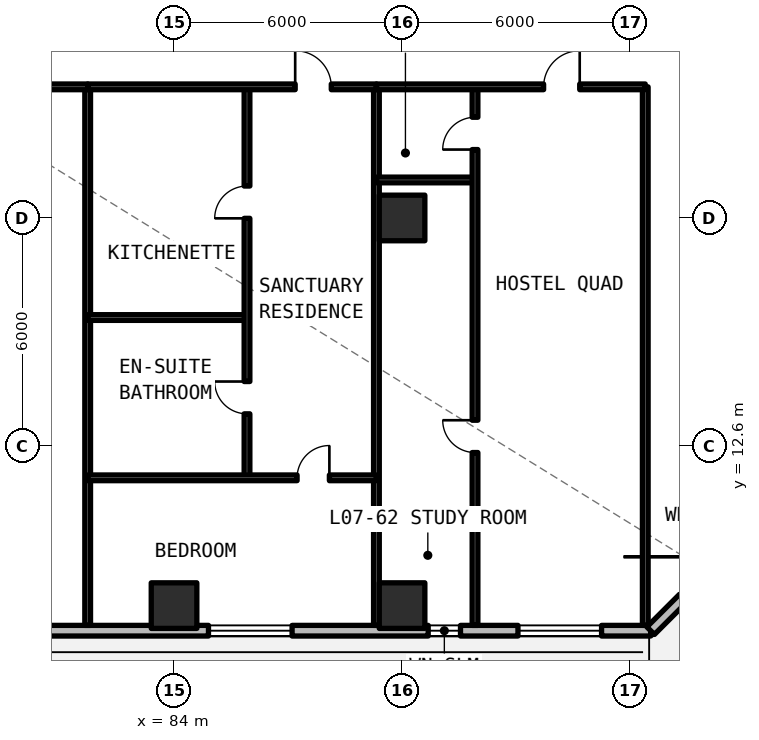
"""IFC4 building model, lengths in metres.
Left out: names, types, materials, properties, quantities, classifications, styles, units other than length and angle.
Written with IfcOpenShell. Run it as: python <this file> out.ifc"""

import sys

from ifc_helpers import new_model, si_unit, direction, frame, frame_2d, origin, origin_2d, place, context, subcontext, project, spatial, rectangle, extrude, element, fill, save


model = new_model("IFC4")
c1 = context("Model", 3, precision=1e-05, world=origin(), true_north=direction((0.0, 1.0)))
c2 = subcontext(c1, "Body", "Model", "MODEL_VIEW")
j1 = project(units=[si_unit("LENGTHUNIT", "METRE"), si_unit("PLANEANGLEUNIT", "RADIAN")], contexts=[c1])
p1 = place(None, origin())
s1 = spatial("IfcSite", under=j1, at=p1, CompositionType="ELEMENT")
p2 = place(p1, origin())
s2 = spatial("IfcBuilding", under=s1, at=p2, CompositionType="ELEMENT")
p3 = place(p2, frame((0.0, 0.0, 29.04)))
s3 = spatial("IfcBuildingStorey", under=s2, at=p3, CompositionType="ELEMENT", Elevation=29.04)
p4 = place(p3, frame((90.0, 18.6, 0.0), z_axis=(0.0, 0.0, 1.0), x_axis=(1.0, 0.0, 0.0)))
e1 = element("IfcColumn", 1, at=p4, inside=s3, PredefinedType="COLUMN", context=c2, shape_type="SweptSolid", body=[
    extrude(rectangle(XDim=1.2, YDim=1.2, at=origin_2d()), origin(), (0.0, 0.0, 1.0), 3.3),
])
for number, where, z_axis, x_axis in (
    (2, (84.0, 8.4, -0.24), (0.0, 0.0, 1.0), (1.0, 0.0, 0.0)),
    (3, (90.0, 8.4, -0.24), (0.0, 0.0, 1.0), (1.0, 0.0, 0.0)),
):
    element("IfcColumn", number, at=place(p3, frame(where, z_axis=z_axis, x_axis=x_axis)), inside=s3, PredefinedType="COLUMN", context=c2, shape_type="SweptSolid", body=[
        extrude(rectangle(XDim=1.2, YDim=1.2, at=origin_2d()), origin(), (0.0, 0.0, 1.0), 3.54),
    ])
p5 = place(p3, frame((52.14, 7.74, 0.0), z_axis=(0.0, 0.0, 1.0), x_axis=(1.0, 0.0, 0.0)))
e4 = element("IfcWall", 4, at=p5, inside=s3, PredefinedType="SOLIDWALL", context=c2, shape_type="SweptSolid", body=[
    extrude(rectangle(XDim=44.402, YDim=0.28, at=frame_2d((22.201, 0.0))), origin(), (0.0, 0.0, 1.0), 3.08),
])
p6 = place(p5, frame((2.664, 0.0, 0.78)))
e5 = element("IfcOpeningElement", 5, at=p6, cuts=e4, PredefinedType="OPENING", context=c2, shape_type="SweptSolid", body=[
    extrude(rectangle(XDim=2.2, YDim=1.66, at=frame_2d((1.1, 0.83))), frame((0.0, 0.15, 0.0), z_axis=(0.0, -1.0, 0.0), x_axis=(1.0, 0.0, 0.0)), (0.0, 0.0, 1.0), 0.3),
])
p7 = place(p5, frame((8.967, 0.0, 0.78)))
e6 = element("IfcOpeningElement", 6, at=p7, cuts=e4, PredefinedType="OPENING", context=c2, shape_type="SweptSolid", body=[
    extrude(rectangle(XDim=2.2, YDim=1.66, at=frame_2d((1.1, 0.83))), frame((0.0, 0.15, 0.0), z_axis=(0.0, -1.0, 0.0), x_axis=(1.0, 0.0, 0.0)), (0.0, 0.0, 1.0), 0.3),
])
p8 = place(p5, frame((16.566, 0.0, 0.78)))
e7 = element("IfcOpeningElement", 7, at=p8, cuts=e4, PredefinedType="OPENING", context=c2, shape_type="SweptSolid", body=[
    extrude(rectangle(XDim=2.2, YDim=1.66, at=frame_2d((1.1, 0.83))), frame((0.0, 0.15, 0.0), z_axis=(0.0, -1.0, 0.0), x_axis=(1.0, 0.0, 0.0)), (0.0, 0.0, 1.0), 0.3),
])
p9 = place(p5, frame((22.826, 0.0, 0.78)))
e8 = element("IfcOpeningElement", 8, at=p9, cuts=e4, PredefinedType="OPENING", context=c2, shape_type="SweptSolid", body=[
    extrude(rectangle(XDim=2.2, YDim=1.66, at=frame_2d((1.1, 0.83))), frame((0.0, 0.15, 0.0), z_axis=(0.0, -1.0, 0.0), x_axis=(1.0, 0.0, 0.0)), (0.0, 0.0, 1.0), 0.3),
])
p10 = place(p5, frame((32.766, 0.0, 0.78)))
e9 = element("IfcOpeningElement", 9, at=p10, cuts=e4, PredefinedType="OPENING", context=c2, shape_type="SweptSolid", body=[
    extrude(rectangle(XDim=2.2, YDim=1.66, at=frame_2d((1.1, 0.83))), frame((0.0, 0.15, 0.0), z_axis=(0.0, -1.0, 0.0), x_axis=(1.0, 0.0, 0.0)), (0.0, 0.0, 1.0), 0.3),
])
p11 = place(p5, frame((38.548, 0.0, 0.78)))
e10 = element("IfcOpeningElement", 10, at=p11, cuts=e4, PredefinedType="OPENING", context=c2, shape_type="SweptSolid", body=[
    extrude(rectangle(XDim=0.85, YDim=1.65, at=frame_2d((0.425, 0.825))), frame((0.0, 0.15, 0.0), z_axis=(0.0, -1.0, 0.0), x_axis=(1.0, 0.0, 0.0)), (0.0, 0.0, 1.0), 0.3),
])
p12 = place(p5, frame((40.91, 0.0, 0.78)))
e11 = element("IfcOpeningElement", 11, at=p12, cuts=e4, PredefinedType="OPENING", context=c2, shape_type="SweptSolid", body=[
    extrude(rectangle(XDim=2.2, YDim=1.66, at=frame_2d((1.1, 0.83))), frame((0.0, 0.15, 0.0), z_axis=(0.0, -1.0, 0.0), x_axis=(1.0, 0.0, 0.0)), (0.0, 0.0, 1.0), 0.3),
])
p13 = place(p3, frame((96.542, 7.74, 0.0), z_axis=(0.0, 0.0, 1.0), x_axis=(0.707106781187, 0.707106781187, 0.0)))
e12 = element("IfcWall", 12, at=p13, inside=s3, PredefinedType="SOLIDWALL", context=c2, shape_type="SweptSolid", body=[
    extrude(rectangle(XDim=5.824, YDim=0.28, at=frame_2d((2.912, 0.0))), origin(), (0.0, 0.0, 1.0), 3.08),
])
p14 = place(p13, frame((1.212, 0.0, 0.78)))
e13 = element("IfcOpeningElement", 13, at=p14, cuts=e12, PredefinedType="OPENING", context=c2, shape_type="SweptSolid", body=[
    extrude(rectangle(XDim=3.4, YDim=1.66, at=frame_2d((1.7, 0.83))), frame((0.0, 0.15, 0.0), z_axis=(0.0, -1.0, 0.0), x_axis=(1.0, 0.0, 0.0)), (0.0, 0.0, 1.0), 0.3),
])
for number, where, z_axis, x_axis in (
    (14, (96.4, 7.88, 0.0), (0.0, 0.0, 1.0), (0.0, 1.0, 0.0)),
    (15, (81.727, 7.88, 0.0), (0.0, 0.0, 1.0), (0.0, 1.0, 0.0)),
):
    element("IfcWall", number, at=place(p3, frame(where, z_axis=z_axis, x_axis=x_axis)), inside=s3, PredefinedType="SOLIDWALL", context=c2, shape_type="SweptSolid", body=[
        extrude(rectangle(XDim=14.17, YDim=0.15, at=frame_2d((7.085, 0.0))), origin(), (0.0, 0.0, 1.0), 2.35),
    ])
p15 = place(p3, frame((73.605, 22.05, 0.0), z_axis=(0.0, 0.0, 1.0), x_axis=(1.0, 0.0, 0.0)))
e16 = element("IfcWall", 16, at=p15, inside=s3, PredefinedType="SOLIDWALL", context=c2, shape_type="SweptSolid", body=[
    extrude(rectangle(XDim=8.122, YDim=0.15, at=frame_2d((4.061, 0.0))), origin(), (0.0, 0.0, 1.0), 2.35),
])
p16 = place(p15, frame((3.511, 0.0, 0.0)))
e17 = element("IfcOpeningElement", 17, at=p16, cuts=e16, PredefinedType="OPENING", context=c2, shape_type="SweptSolid", body=[
    extrude(rectangle(XDim=1.1, YDim=2.15, at=frame_2d((0.55, 1.075))), frame((0.0, 0.085, 0.0), z_axis=(0.0, -1.0, 0.0), x_axis=(1.0, 0.0, 0.0)), (0.0, 0.0, 1.0), 0.17),
])
p17 = place(p3, frame((89.326, 7.88, 0.0), z_axis=(0.0, 0.0, 1.0), x_axis=(0.0, 1.0, 0.0)))
e18 = element("IfcWall", 18, at=p17, inside=s3, PredefinedType="SOLIDWALL", context=c2, shape_type="SweptSolid", body=[
    extrude(rectangle(XDim=14.17, YDim=0.15, at=frame_2d((7.085, 0.0))), origin(), (0.0, 0.0, 1.0), 2.35),
])
p18 = place(p3, frame((81.727, 15.98, 0.0), z_axis=(0.0, 0.0, 1.0), x_axis=(1.0, 0.0, 0.0)))
e19 = element("IfcWall", 19, at=p18, inside=s3, PredefinedType="PARTITIONING", context=c2, shape_type="SweptSolid", body=[
    extrude(rectangle(XDim=4.193, YDim=0.15, at=frame_2d((2.096, 0.0))), origin(), (0.0, 0.0, 1.0), 2.35),
])
p19 = place(p3, frame((85.92, 11.762, 0.0), z_axis=(0.0, 0.0, 1.0), x_axis=(0.0, 1.0, 0.0)))
e20 = element("IfcWall", 20, at=p19, inside=s3, PredefinedType="PARTITIONING", context=c2, shape_type="SweptSolid", body=[
    extrude(rectangle(XDim=10.288, YDim=0.15, at=frame_2d((5.144, 0.0))), origin(), (0.0, 0.0, 1.0), 2.35),
])
p20 = place(p19, frame((1.684, 0.0, 0.0)))
e21 = element("IfcOpeningElement", 21, at=p20, cuts=e20, PredefinedType="OPENING", context=c2, shape_type="SweptSolid", body=[
    extrude(rectangle(XDim=0.85, YDim=2.1, at=frame_2d((0.425, 1.05))), frame((0.0, 0.085, 0.0), z_axis=(0.0, -1.0, 0.0), x_axis=(1.0, 0.0, 0.0)), (0.0, 0.0, 1.0), 0.17),
])
p21 = place(p19, frame((6.828, 0.0, 0.0)))
e22 = element("IfcOpeningElement", 22, at=p21, cuts=e20, PredefinedType="OPENING", context=c2, shape_type="SweptSolid", body=[
    extrude(rectangle(XDim=0.85, YDim=2.1, at=frame_2d((0.425, 1.05))), frame((0.0, 0.085, 0.0), z_axis=(0.0, -1.0, 0.0), x_axis=(1.0, 0.0, 0.0)), (0.0, 0.0, 1.0), 0.17),
])
p22 = place(p3, frame((81.727, 11.762, 0.0), z_axis=(0.0, 0.0, 1.0), x_axis=(1.0, 0.0, 0.0)))
e23 = element("IfcWall", 23, at=p22, inside=s3, PredefinedType="PARTITIONING", context=c2, shape_type="SweptSolid", body=[
    extrude(rectangle(XDim=7.598, YDim=0.15, at=frame_2d((3.799, 0.0))), origin(), (0.0, 0.0, 1.0), 2.35),
])
p23 = place(p22, frame((5.51, 0.0, 0.0)))
e24 = element("IfcOpeningElement", 24, at=p23, cuts=e23, PredefinedType="OPENING", context=c2, shape_type="SweptSolid", body=[
    extrude(rectangle(XDim=0.85, YDim=2.1, at=frame_2d((0.425, 1.05))), frame((0.0, 0.085, 0.0), z_axis=(0.0, -1.0, 0.0), x_axis=(1.0, 0.0, 0.0)), (0.0, 0.0, 1.0), 0.17),
])
p24 = place(p3, frame((81.727, 22.05, 0.0), z_axis=(0.0, 0.0, 1.0), x_axis=(1.0, 0.0, 0.0)))
e25 = element("IfcWall", 25, at=p24, inside=s3, PredefinedType="SOLIDWALL", context=c2, shape_type="SweptSolid", body=[
    extrude(rectangle(XDim=7.598, YDim=0.15, at=frame_2d((3.799, 0.0))), origin(), (0.0, 0.0, 1.0), 2.35),
])
p25 = place(p24, frame((5.46, 0.0, 0.0)))
e26 = element("IfcOpeningElement", 26, at=p25, cuts=e25, PredefinedType="OPENING", context=c2, shape_type="SweptSolid", body=[
    extrude(rectangle(XDim=0.95, YDim=2.15, at=frame_2d((0.475, 1.075))), frame((0.0, 0.085, 0.0), z_axis=(0.0, -1.0, 0.0), x_axis=(1.0, 0.0, 0.0)), (0.0, 0.0, 1.0), 0.17),
])
p26 = place(p3, frame((89.326, 19.6, 0.0), z_axis=(0.0, 0.0, 1.0), x_axis=(1.0, 0.0, 0.0)))
e27 = element("IfcWall", 27, at=p26, inside=s3, PredefinedType="PARTITIONING", context=c2, shape_type="SweptSolid", body=[
    extrude(rectangle(XDim=2.594, YDim=0.15, at=frame_2d((1.297, 0.0))), origin(), (0.0, 0.0, 1.0), 2.35),
])
p27 = place(p3, frame((91.92, 7.88, 0.0), z_axis=(0.0, 0.0, 1.0), x_axis=(0.0, 1.0, 0.0)))
e28 = element("IfcWall", 28, at=p27, inside=s3, PredefinedType="PARTITIONING", context=c2, shape_type="SweptSolid", body=[
    extrude(rectangle(XDim=14.17, YDim=0.15, at=frame_2d((7.085, 0.0))), origin(), (0.0, 0.0, 1.0), 2.35),
])
p28 = place(p27, frame((4.548, 0.0, 0.0)))
e29 = element("IfcOpeningElement", 29, at=p28, cuts=e28, PredefinedType="OPENING", context=c2, shape_type="SweptSolid", body=[
    extrude(rectangle(XDim=0.85, YDim=2.1, at=frame_2d((0.425, 1.05))), frame((0.0, 0.085, 0.0), z_axis=(0.0, -1.0, 0.0), x_axis=(1.0, 0.0, 0.0)), (0.0, 0.0, 1.0), 0.17),
])
p29 = place(p27, frame((12.52, 0.0, 0.0)))
e30 = element("IfcOpeningElement", 30, at=p29, cuts=e28, PredefinedType="OPENING", context=c2, shape_type="SweptSolid", body=[
    extrude(rectangle(XDim=0.85, YDim=2.1, at=frame_2d((0.425, 1.05))), frame((0.0, 0.085, 0.0), z_axis=(0.0, -1.0, 0.0), x_axis=(1.0, 0.0, 0.0)), (0.0, 0.0, 1.0), 0.17),
])
p30 = place(p3, frame((89.326, 22.05, 0.0), z_axis=(0.0, 0.0, 1.0), x_axis=(1.0, 0.0, 0.0)))
e31 = element("IfcWall", 31, at=p30, inside=s3, PredefinedType="SOLIDWALL", context=c2, shape_type="SweptSolid", body=[
    extrude(rectangle(XDim=7.074, YDim=0.15, at=frame_2d((3.537, 0.0))), origin(), (0.0, 0.0, 1.0), 2.35),
])
p31 = place(p30, frame((4.399, 0.0, 0.0)))
e32 = element("IfcOpeningElement", 32, at=p31, cuts=e31, PredefinedType="OPENING", context=c2, shape_type="SweptSolid", body=[
    extrude(rectangle(XDim=0.95, YDim=2.15, at=frame_2d((0.475, 1.075))), frame((0.0, 0.085, 0.0), z_axis=(0.0, -1.0, 0.0), x_axis=(1.0, 0.0, 0.0)), (0.0, 0.0, 1.0), 0.17),
])
p32 = place(p10, origin())
e33 = element("IfcWindow", 33, at=p32, inside=s3, PartitioningType="SINGLE_PANEL", PredefinedType="WINDOW", context=c2, shape_type="SweptSolid", body=[
    extrude(rectangle(XDim=2.2, YDim=1.66, at=frame_2d((1.1, 0.83))), frame((0.0, 0.03, 0.0), z_axis=(0.0, -1.0, 0.0), x_axis=(1.0, 0.0, 0.0)), (0.0, 0.0, 1.0), 0.06),
])
fill(e9, e33)
p33 = place(p11, origin())
e34 = element("IfcWindow", 34, at=p33, inside=s3, PartitioningType="SINGLE_PANEL", PredefinedType="WINDOW", context=c2, shape_type="SweptSolid", body=[
    extrude(rectangle(XDim=0.85, YDim=1.65, at=frame_2d((0.425, 0.825))), frame((0.0, 0.03, 0.0), z_axis=(0.0, -1.0, 0.0), x_axis=(1.0, 0.0, 0.0)), (0.0, 0.0, 1.0), 0.06),
])
fill(e10, e34)
p34 = place(p12, origin())
e35 = element("IfcWindow", 35, at=p34, inside=s3, PartitioningType="SINGLE_PANEL", PredefinedType="WINDOW", context=c2, shape_type="SweptSolid", body=[
    extrude(rectangle(XDim=2.2, YDim=1.66, at=frame_2d((1.1, 0.83))), frame((0.0, 0.03, 0.0), z_axis=(0.0, -1.0, 0.0), x_axis=(1.0, 0.0, 0.0)), (0.0, 0.0, 1.0), 0.06),
])
fill(e11, e35)
p35 = place(p20, origin())
e36 = element("IfcDoor", 36, at=p35, inside=s3, OperationType="SINGLE_SWING_RIGHT", PredefinedType="DOOR", context=c2, shape_type="SweptSolid", body=[
    extrude(rectangle(XDim=0.85, YDim=2.1, at=frame_2d((0.425, 1.05))), frame((0.0, 0.025, 0.0), z_axis=(0.0, -1.0, 0.0), x_axis=(1.0, 0.0, 0.0)), (0.0, 0.0, 1.0), 0.05),
])
fill(e21, e36)
p36 = place(p21, origin())
e37 = element("IfcDoor", 37, at=p36, inside=s3, OperationType="SINGLE_SWING_LEFT", PredefinedType="DOOR", context=c2, shape_type="SweptSolid", body=[
    extrude(rectangle(XDim=0.85, YDim=2.1, at=frame_2d((0.425, 1.05))), frame((0.0, 0.025, 0.0), z_axis=(0.0, -1.0, 0.0), x_axis=(1.0, 0.0, 0.0)), (0.0, 0.0, 1.0), 0.05),
])
fill(e22, e37)
p37 = place(p23, origin())
e38 = element("IfcDoor", 38, at=p37, inside=s3, OperationType="SINGLE_SWING_RIGHT", PredefinedType="DOOR", context=c2, shape_type="SweptSolid", body=[
    extrude(rectangle(XDim=0.85, YDim=2.1, at=frame_2d((0.425, 1.05))), frame((0.0, 0.025, 0.0), z_axis=(0.0, -1.0, 0.0), x_axis=(1.0, 0.0, 0.0)), (0.0, 0.0, 1.0), 0.05),
])
fill(e24, e38)
p38 = place(p25, origin())
e39 = element("IfcDoor", 39, at=p38, inside=s3, OperationType="SINGLE_SWING_LEFT", PredefinedType="DOOR", context=c2, shape_type="SweptSolid", body=[
    extrude(rectangle(XDim=0.95, YDim=2.15, at=frame_2d((0.475, 1.075))), frame((0.0, 0.025, 0.0), z_axis=(0.0, -1.0, 0.0), x_axis=(1.0, 0.0, 0.0)), (0.0, 0.0, 1.0), 0.05),
])
fill(e26, e39)
p39 = place(p28, origin())
e40 = element("IfcDoor", 40, at=p39, inside=s3, OperationType="SINGLE_SWING_RIGHT", PredefinedType="DOOR", context=c2, shape_type="SweptSolid", body=[
    extrude(rectangle(XDim=0.85, YDim=2.1, at=frame_2d((0.425, 1.05))), frame((0.0, 0.025, 0.0), z_axis=(0.0, -1.0, 0.0), x_axis=(1.0, 0.0, 0.0)), (0.0, 0.0, 1.0), 0.05),
])
fill(e29, e40)
p40 = place(p29, origin())
e41 = element("IfcDoor", 41, at=p40, inside=s3, OperationType="SINGLE_SWING_LEFT", PredefinedType="DOOR", context=c2, shape_type="SweptSolid", body=[
    extrude(rectangle(XDim=0.85, YDim=2.1, at=frame_2d((0.425, 1.05))), frame((0.0, 0.025, 0.0), z_axis=(0.0, -1.0, 0.0), x_axis=(1.0, 0.0, 0.0)), (0.0, 0.0, 1.0), 0.05),
])
fill(e30, e41)
p41 = place(p31, origin())
e42 = element("IfcDoor", 42, at=p41, inside=s3, OperationType="SINGLE_SWING_RIGHT", PredefinedType="DOOR", context=c2, shape_type="SweptSolid", body=[
    extrude(rectangle(XDim=0.95, YDim=2.15, at=frame_2d((0.475, 1.075))), frame((0.0, 0.025, 0.0), z_axis=(0.0, -1.0, 0.0), x_axis=(1.0, 0.0, 0.0)), (0.0, 0.0, 1.0), 0.05),
])
fill(e32, e42)
save(model, sys.argv[1])
